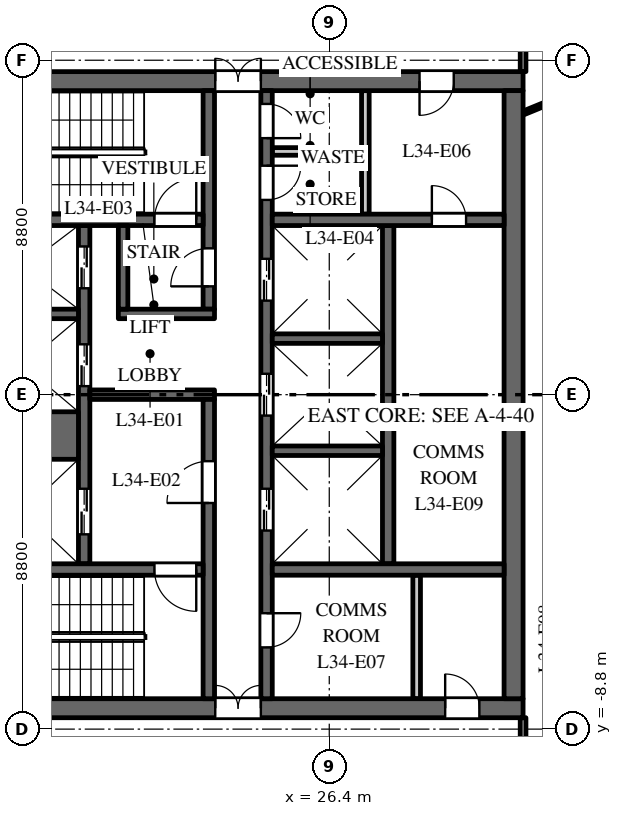
"""IFC4 building model, lengths in metres.
Left out: names, types, materials, properties, quantities, classifications, styles, units other than length and angle.
Written with IfcOpenShell. Run it as: python <this file> out.ifc"""

import sys

from ifc_helpers import new_model, si_unit, direction, frame, frame_2d, origin, place, context, subcontext, project, spatial, rectangle, extrude, element, fill, save


model = new_model("IFC4")
c1 = context("Model", 3, precision=1e-05, world=origin(), true_north=direction((0.0, 1.0)))
c2 = subcontext(c1, "Body", "Model", "MODEL_VIEW")
j1 = project(units=[si_unit("LENGTHUNIT", "METRE"), si_unit("PLANEANGLEUNIT", "RADIAN")], contexts=[c1])
p1 = place(None, origin())
s1 = spatial("IfcSite", under=j1, at=p1, CompositionType="ELEMENT")
p2 = place(p1, origin())
s2 = spatial("IfcBuilding", under=s1, at=p2, CompositionType="ELEMENT")
p3 = place(p2, frame((0.0, 0.0, 150.0)))
s3 = spatial("IfcBuildingStorey", under=s2, at=p3, CompositionType="ELEMENT", Elevation=150.0)
p4 = place(p3, frame((16.5, 8.25, 0.0), z_axis=(0.0, 0.0, 1.0), x_axis=(1.0, 0.0, 0.0)))
e1 = element("IfcWall", 1, at=p4, inside=s3, PredefinedType="SHEAR", context=c2, shape_type="SweptSolid", body=[
    extrude(rectangle(XDim=15.0, YDim=0.5, at=frame_2d((7.5, 0.0))), origin(), (0.0, 0.0, 1.0), 3.7),
])
p5 = place(p4, frame((6.9, 0.0, 0.0)))
e2 = element("IfcOpeningElement", 2, at=p5, cuts=e1, PredefinedType="OPENING", context=c2, shape_type="SweptSolid", body=[
    extrude(rectangle(XDim=1.2, YDim=2.1, at=frame_2d((0.6, 1.05))), frame((0.0, 0.26, 0.0), z_axis=(0.0, -1.0, 0.0), x_axis=(1.0, 0.0, 0.0)), (0.0, 0.0, 1.0), 0.52),
])
p6 = place(p4, frame((12.275, 0.0, 0.0)))
e3 = element("IfcOpeningElement", 3, at=p6, cuts=e1, PredefinedType="OPENING", context=c2, shape_type="SweptSolid", body=[
    extrude(rectangle(XDim=0.9, YDim=2.1, at=frame_2d((0.45, 1.05))), frame((0.0, 0.26, 0.0), z_axis=(0.0, -1.0, 0.0), x_axis=(1.0, 0.0, 0.0)), (0.0, 0.0, 1.0), 0.52),
])
p7 = place(p3, frame((16.5, -8.25, 0.0), z_axis=(0.0, 0.0, 1.0), x_axis=(1.0, 0.0, 0.0)))
e4 = element("IfcWall", 4, at=p7, inside=s3, PredefinedType="SHEAR", context=c2, shape_type="SweptSolid", body=[
    extrude(rectangle(XDim=15.0, YDim=0.5, at=frame_2d((7.5, 0.0))), origin(), (0.0, 0.0, 1.0), 3.7),
])
p8 = place(p7, frame((6.9, 0.0, 0.0)))
e5 = element("IfcOpeningElement", 5, at=p8, cuts=e4, PredefinedType="OPENING", context=c2, shape_type="SweptSolid", body=[
    extrude(rectangle(XDim=1.2, YDim=2.1, at=frame_2d((0.6, 1.05))), frame((0.0, 0.26, 0.0), z_axis=(0.0, -1.0, 0.0), x_axis=(1.0, 0.0, 0.0)), (0.0, 0.0, 1.0), 0.52),
])
p9 = place(p7, frame((12.95, 0.0, 0.0)))
e6 = element("IfcOpeningElement", 6, at=p9, cuts=e4, PredefinedType="OPENING", context=c2, shape_type="SweptSolid", body=[
    extrude(rectangle(XDim=0.9, YDim=2.1, at=frame_2d((0.45, 1.05))), frame((0.0, 0.26, 0.0), z_axis=(0.0, -1.0, 0.0), x_axis=(1.0, 0.0, 0.0)), (0.0, 0.0, 1.0), 0.52),
])
p10 = place(p3, frame((27.95, -4.45, 0.0), z_axis=(0.0, 0.0, 1.0), x_axis=(0.0, 1.0, 0.0)))
e7 = element("IfcWall", 7, at=p10, inside=s3, PredefinedType="SHEAR", context=c2, shape_type="SweptSolid", body=[
    extrude(rectangle(XDim=8.9, YDim=0.3, at=frame_2d((4.45, 0.0))), origin(), (0.0, 0.0, 1.0), 3.7),
])
p11 = place(p3, frame((19.95, -4.45, 0.0), z_axis=(0.0, 0.0, 1.0), x_axis=(0.0, 1.0, 0.0)))
e8 = element("IfcWall", 8, at=p11, inside=s3, PredefinedType="SHEAR", context=c2, shape_type="SweptSolid", body=[
    extrude(rectangle(XDim=8.9, YDim=0.3, at=frame_2d((4.45, 0.0))), origin(), (0.0, 0.0, 1.0), 3.7),
])
p12 = place(p11, frame((0.775, 0.0, 0.0)))
e9 = element("IfcOpeningElement", 9, at=p12, cuts=e8, PredefinedType="OPENING", context=c2, shape_type="SweptSolid", body=[
    extrude(rectangle(XDim=1.2, YDim=2.1, at=frame_2d((0.6, 1.05))), frame((0.0, 0.16, 0.0), z_axis=(0.0, -1.0, 0.0), x_axis=(1.0, 0.0, 0.0)), (0.0, 0.0, 1.0), 0.32),
])
p13 = place(p11, frame((4.675, 0.0, 0.0)))
e10 = element("IfcOpeningElement", 10, at=p13, cuts=e8, PredefinedType="OPENING", context=c2, shape_type="SweptSolid", body=[
    extrude(rectangle(XDim=1.1, YDim=2.1, at=frame_2d((0.55, 1.05))), frame((0.0, 0.16, 0.0), z_axis=(0.0, -1.0, 0.0), x_axis=(1.0, 0.0, 0.0)), (0.0, 0.0, 1.0), 0.32),
])
p14 = place(p11, frame((7.25, 0.0, 0.0)))
e11 = element("IfcOpeningElement", 11, at=p14, cuts=e8, PredefinedType="OPENING", context=c2, shape_type="SweptSolid", body=[
    extrude(rectangle(XDim=1.1, YDim=2.1, at=frame_2d((0.55, 1.05))), frame((0.0, 0.16, 0.0), z_axis=(0.0, -1.0, 0.0), x_axis=(1.0, 0.0, 0.0)), (0.0, 0.0, 1.0), 0.32),
])
p15 = place(p3, frame((24.75, -8.0, 0.0), z_axis=(0.0, 0.0, 1.0), x_axis=(0.0, 1.0, 0.0)))
e12 = element("IfcWall", 12, at=p15, inside=s3, PredefinedType="SHEAR", context=c2, shape_type="SweptSolid", body=[
    extrude(rectangle(XDim=16.0, YDim=0.3, at=frame_2d((8.0, 0.0))), origin(), (0.0, 0.0, 1.0), 3.7),
])
p16 = place(p15, frame((4.425, 0.0, 0.0)))
e13 = element("IfcOpeningElement", 13, at=p16, cuts=e12, PredefinedType="OPENING", context=c2, shape_type="SweptSolid", body=[
    extrude(rectangle(XDim=1.1, YDim=2.1, at=frame_2d((0.55, 1.05))), frame((0.0, 0.16, 0.0), z_axis=(0.0, -1.0, 0.0), x_axis=(1.0, 0.0, 0.0)), (0.0, 0.0, 1.0), 0.32),
])
p17 = place(p15, frame((7.45, 0.0, 0.0)))
e14 = element("IfcOpeningElement", 14, at=p17, cuts=e12, PredefinedType="OPENING", context=c2, shape_type="SweptSolid", body=[
    extrude(rectangle(XDim=1.1, YDim=2.1, at=frame_2d((0.55, 1.05))), frame((0.0, 0.16, 0.0), z_axis=(0.0, -1.0, 0.0), x_axis=(1.0, 0.0, 0.0)), (0.0, 0.0, 1.0), 0.32),
])
p18 = place(p15, frame((10.475, 0.0, 0.0)))
e15 = element("IfcOpeningElement", 15, at=p18, cuts=e12, PredefinedType="OPENING", context=c2, shape_type="SweptSolid", body=[
    extrude(rectangle(XDim=1.1, YDim=2.1, at=frame_2d((0.55, 1.05))), frame((0.0, 0.16, 0.0), z_axis=(0.0, -1.0, 0.0), x_axis=(1.0, 0.0, 0.0)), (0.0, 0.0, 1.0), 0.32),
])
p19 = place(p15, frame((13.125, 0.0, 0.0)))
e16 = element("IfcOpeningElement", 16, at=p19, cuts=e12, PredefinedType="OPENING", context=c2, shape_type="SweptSolid", body=[
    extrude(rectangle(XDim=0.9, YDim=2.1, at=frame_2d((0.45, 1.05))), frame((0.0, 0.16, 0.0), z_axis=(0.0, -1.0, 0.0), x_axis=(1.0, 0.0, 0.0)), (0.0, 0.0, 1.0), 0.32),
])
p20 = place(p15, frame((14.75, 0.0, 0.0)))
e17 = element("IfcOpeningElement", 17, at=p20, cuts=e12, PredefinedType="OPENING", context=c2, shape_type="SweptSolid", body=[
    extrude(rectangle(XDim=0.9, YDim=2.1, at=frame_2d((0.45, 1.05))), frame((0.0, 0.16, 0.0), z_axis=(0.0, -1.0, 0.0), x_axis=(1.0, 0.0, 0.0)), (0.0, 0.0, 1.0), 0.32),
])
p21 = place(p15, frame((1.35, 0.0, 0.0)))
e18 = element("IfcOpeningElement", 18, at=p21, cuts=e12, PredefinedType="OPENING", context=c2, shape_type="SweptSolid", body=[
    extrude(rectangle(XDim=0.9, YDim=2.1, at=frame_2d((0.45, 1.05))), frame((0.0, 0.16, 0.0), z_axis=(0.0, -1.0, 0.0), x_axis=(1.0, 0.0, 0.0)), (0.0, 0.0, 1.0), 0.32),
])
p22 = place(p3, frame((20.1, 0.0, 0.0), z_axis=(0.0, 0.0, 1.0), x_axis=(1.0, 0.0, 0.0)))
e19 = element("IfcWall", 19, at=p22, inside=s3, PredefinedType="SHEAR", context=c2, shape_type="SweptSolid", body=[
    extrude(rectangle(XDim=3.28, YDim=0.25, at=frame_2d((1.64, 0.0))), origin(), (0.0, 0.0, 1.0), 3.7),
])
p23 = place(p3, frame((31.25, -8.0, 0.0), z_axis=(0.0, 0.0, 1.0), x_axis=(0.0, 1.0, 0.0)))
e20 = element("IfcWall", 20, at=p23, inside=s3, PredefinedType="SHEAR", context=c2, shape_type="SweptSolid", body=[
    extrude(rectangle(XDim=16.0, YDim=0.5, at=frame_2d((8.0, 0.0))), origin(), (0.0, 0.0, 1.0), 3.7),
])
p24 = place(p3, frame((24.9, 4.6, 0.0), z_axis=(0.0, 0.0, 1.0), x_axis=(1.0, 0.0, 0.0)))
e21 = element("IfcWall", 21, at=p24, inside=s3, PredefinedType="SHEAR", context=c2, shape_type="SweptSolid", body=[
    extrude(rectangle(XDim=6.1, YDim=0.3, at=frame_2d((3.05, 0.0))), origin(), (0.0, 0.0, 1.0), 3.7),
])
p25 = place(p24, frame((4.2, 0.0, 0.0)))
e22 = element("IfcOpeningElement", 22, at=p25, cuts=e21, PredefinedType="OPENING", context=c2, shape_type="SweptSolid", body=[
    extrude(rectangle(XDim=0.9, YDim=2.1, at=frame_2d((0.45, 1.05))), frame((0.0, 0.16, 0.0), z_axis=(0.0, -1.0, 0.0), x_axis=(1.0, 0.0, 0.0)), (0.0, 0.0, 1.0), 0.32),
])
for number, where, z_axis, x_axis in (
    (23, (27.35, 4.75, 0.0), (0.0, 0.0, 1.0), (0.0, 1.0, 0.0)),
    (24, (28.7, -8.0, 0.0), (0.0, 0.0, 1.0), (0.0, 1.0, 0.0)),
):
    element("IfcWall", number, at=place(p3, frame(where, z_axis=z_axis, x_axis=x_axis)), inside=s3, PredefinedType="PARTITIONING", context=c2, shape_type="SweptSolid", body=[
        extrude(rectangle(XDim=3.25, YDim=0.2, at=frame_2d((1.625, 0.0))), origin(), (0.0, 0.0, 1.0), 3.7),
    ])
p26 = place(p3, frame((24.9, 6.4, 0.0), z_axis=(0.0, 0.0, 1.0), x_axis=(1.0, 0.0, 0.0)))
e25 = element("IfcWall", 25, at=p26, inside=s3, PredefinedType="PARTITIONING", context=c2, shape_type="SweptSolid", body=[
    extrude(rectangle(XDim=2.35, YDim=0.2, at=frame_2d((1.175, 0.0))), origin(), (0.0, 0.0, 1.0), 3.7),
])
p27 = place(p3, frame((24.9, -4.6, 0.0), z_axis=(0.0, 0.0, 1.0), x_axis=(1.0, 0.0, 0.0)))
e26 = element("IfcWall", 26, at=p27, inside=s3, PredefinedType="SHEAR", context=c2, shape_type="SweptSolid", body=[
    extrude(rectangle(XDim=6.1, YDim=0.3, at=frame_2d((3.05, 0.0))), origin(), (0.0, 0.0, 1.0), 3.7),
])
p28 = place(p3, frame((16.9, -1.075, 0.0), z_axis=(0.0, 0.0, 1.0), x_axis=(1.0, 0.0, 0.0)))
e27 = element("IfcWall", 27, at=p28, inside=s3, PredefinedType="SHEAR", context=c2, shape_type="SweptSolid", body=[
    extrude(rectangle(XDim=2.9, YDim=1.25, at=frame_2d((1.45, 0.0))), origin(), (0.0, 0.0, 1.0), 3.7),
])
for number, where, z_axis, x_axis in (
    (28, (16.9, 2.125, 0.0), (0.0, 0.0, 1.0), (1.0, 0.0, 0.0)),
    (29, (24.9, -1.475, 0.0), (0.0, 0.0, 1.0), (1.0, 0.0, 0.0)),
    (30, (24.9, 1.475, 0.0), (0.0, 0.0, 1.0), (1.0, 0.0, 0.0)),
):
    element("IfcWall", number, at=place(p3, frame(where, z_axis=z_axis, x_axis=x_axis)), inside=s3, PredefinedType="SHEAR", context=c2, shape_type="SweptSolid", body=[
        extrude(rectangle(XDim=2.9, YDim=0.25, at=frame_2d((1.45, 0.0))), origin(), (0.0, 0.0, 1.0), 3.7),
    ])
p29 = place(p3, frame((23.23, 2.25, 0.0), z_axis=(0.0, 0.0, 1.0), x_axis=(0.0, 1.0, 0.0)))
e31 = element("IfcWall", 31, at=p29, inside=s3, PredefinedType="SHEAR", context=c2, shape_type="SweptSolid", body=[
    extrude(rectangle(XDim=5.75, YDim=0.3, at=frame_2d((2.875, 0.0))), origin(), (0.0, 0.0, 1.0), 3.7),
])
p30 = place(p29, frame((0.6, 0.0, 0.0)))
e32 = element("IfcOpeningElement", 32, at=p30, cuts=e31, PredefinedType="OPENING", context=c2, shape_type="SweptSolid", body=[
    extrude(rectangle(XDim=1.0, YDim=2.1, at=frame_2d((0.5, 1.05))), frame((0.0, 0.16, 0.0), z_axis=(0.0, -1.0, 0.0), x_axis=(1.0, 0.0, 0.0)), (0.0, 0.0, 1.0), 0.32),
])
p31 = place(p3, frame((23.23, -8.0, 0.0), z_axis=(0.0, 0.0, 1.0), x_axis=(0.0, 1.0, 0.0)))
e33 = element("IfcWall", 33, at=p31, inside=s3, PredefinedType="SHEAR", context=c2, shape_type="SweptSolid", body=[
    extrude(rectangle(XDim=7.875, YDim=0.3, at=frame_2d((3.938, 0.0))), origin(), (0.0, 0.0, 1.0), 3.7),
])
p32 = place(p31, frame((5.15, 0.0, 0.0)))
e34 = element("IfcOpeningElement", 34, at=p32, cuts=e33, PredefinedType="OPENING", context=c2, shape_type="SweptSolid", body=[
    extrude(rectangle(XDim=1.1, YDim=2.1, at=frame_2d((0.55, 1.05))), frame((0.0, 0.16, 0.0), z_axis=(0.0, -1.0, 0.0), x_axis=(1.0, 0.0, 0.0)), (0.0, 0.0, 1.0), 0.32),
])
p33 = place(p3, frame((16.9, 4.6, 0.0), z_axis=(0.0, 0.0, 1.0), x_axis=(1.0, 0.0, 0.0)))
e35 = element("IfcWall", 35, at=p33, inside=s3, PredefinedType="SHEAR", context=c2, shape_type="SweptSolid", body=[
    extrude(rectangle(XDim=6.18, YDim=0.3, at=frame_2d((3.09, 0.0))), origin(), (0.0, 0.0, 1.0), 3.7),
])
p34 = place(p33, frame((4.9, 0.0, 0.0)))
e36 = element("IfcOpeningElement", 36, at=p34, cuts=e35, PredefinedType="OPENING", context=c2, shape_type="SweptSolid", body=[
    extrude(rectangle(XDim=1.1, YDim=2.1, at=frame_2d((0.55, 1.05))), frame((0.0, 0.16, 0.0), z_axis=(0.0, -1.0, 0.0), x_axis=(1.0, 0.0, 0.0)), (0.0, 0.0, 1.0), 0.32),
])
p35 = place(p3, frame((16.9, -4.6, 0.0), z_axis=(0.0, 0.0, 1.0), x_axis=(1.0, 0.0, 0.0)))
e37 = element("IfcWall", 37, at=p35, inside=s3, PredefinedType="SHEAR", context=c2, shape_type="SweptSolid", body=[
    extrude(rectangle(XDim=6.18, YDim=0.3, at=frame_2d((3.09, 0.0))), origin(), (0.0, 0.0, 1.0), 3.7),
])
p36 = place(p35, frame((4.9, 0.0, 0.0)))
e38 = element("IfcOpeningElement", 38, at=p36, cuts=e37, PredefinedType="OPENING", context=c2, shape_type="SweptSolid", body=[
    extrude(rectangle(XDim=1.1, YDim=2.1, at=frame_2d((0.55, 1.05))), frame((0.0, 0.16, 0.0), z_axis=(0.0, -1.0, 0.0), x_axis=(1.0, 0.0, 0.0)), (0.0, 0.0, 1.0), 0.32),
])
p37 = place(p3, frame((20.85, 2.125, 0.0), z_axis=(0.0, 0.0, 1.0), x_axis=(1.0, 0.0, 0.0)))
e39 = element("IfcWall", 39, at=p37, inside=s3, PredefinedType="SHEAR", context=c2, shape_type="SweptSolid", body=[
    extrude(rectangle(XDim=2.53, YDim=0.25, at=frame_2d((1.265, 0.0))), origin(), (0.0, 0.0, 1.0), 3.7),
])
p38 = place(p3, frame((20.975, 2.25, 0.0), z_axis=(0.0, 0.0, 1.0), x_axis=(0.0, 1.0, 0.0)))
e40 = element("IfcWall", 40, at=p38, inside=s3, PredefinedType="SHEAR", context=c2, shape_type="SweptSolid", body=[
    extrude(rectangle(XDim=2.2, YDim=0.25, at=frame_2d((1.1, 0.0))), origin(), (0.0, 0.0, 1.0), 3.7),
])
p39 = place(p3, frame((31.5, -10.7, 0.0), z_axis=(0.0, 0.0, 1.0), x_axis=(0.0, 1.0, 0.0)))
e41 = element("IfcWall", 41, at=p39, inside=s3, PredefinedType="PARTITIONING", context=c2, shape_type="SweptSolid", body=[
    extrude(rectangle(XDim=2.2, YDim=0.15, at=frame_2d((1.1, 0.0))), origin(), (0.0, 0.0, 1.0), 2.9),
])
p40 = place(p3, frame((31.5, 7.41, 0.0), z_axis=(0.0, 0.0, 1.0), x_axis=(0.925344112436, 0.379128307542, 0.0)))
e42 = element("IfcWall", 42, at=p40, inside=s3, PredefinedType="PARTITIONING", context=c2, shape_type="SweptSolid", body=[
    extrude(rectangle(XDim=2.954, YDim=0.1, at=frame_2d((1.477, 0.0))), origin(), (0.0, 0.0, 1.0), 3.7),
])
p41 = place(p3, frame((31.5, 8.5, 0.0), z_axis=(0.0, 0.0, 1.0), x_axis=(0.0, 1.0, 0.0)))
e43 = element("IfcWall", 43, at=p41, inside=s3, PredefinedType="PARTITIONING", context=c2, shape_type="SweptSolid", body=[
    extrude(rectangle(XDim=2.2, YDim=0.15, at=frame_2d((1.1, 0.0))), origin(), (0.0, 0.0, 1.0), 2.9),
])
p42 = place(p12, origin())
e44 = element("IfcDoor", 44, at=p42, inside=s3, OperationType="DOUBLE_DOOR_SLIDING", PredefinedType="DOOR", context=c2, shape_type="SweptSolid", body=[
    extrude(rectangle(XDim=1.2, YDim=2.1, at=frame_2d((0.6, 1.05))), frame((0.0, 0.025, 0.0), z_axis=(0.0, -1.0, 0.0), x_axis=(1.0, 0.0, 0.0)), (0.0, 0.0, 1.0), 0.05),
])
fill(e9, e44)
p43 = place(p13, origin())
e45 = element("IfcDoor", 45, at=p43, inside=s3, OperationType="DOUBLE_DOOR_SLIDING", PredefinedType="DOOR", context=c2, shape_type="SweptSolid", body=[
    extrude(rectangle(XDim=1.1, YDim=2.1, at=frame_2d((0.55, 1.05))), frame((0.0, 0.025, 0.0), z_axis=(0.0, -1.0, 0.0), x_axis=(1.0, 0.0, 0.0)), (0.0, 0.0, 1.0), 0.05),
])
fill(e10, e45)
p44 = place(p14, origin())
e46 = element("IfcDoor", 46, at=p44, inside=s3, OperationType="DOUBLE_DOOR_SLIDING", PredefinedType="DOOR", context=c2, shape_type="SweptSolid", body=[
    extrude(rectangle(XDim=1.1, YDim=2.1, at=frame_2d((0.55, 1.05))), frame((0.0, 0.025, 0.0), z_axis=(0.0, -1.0, 0.0), x_axis=(1.0, 0.0, 0.0)), (0.0, 0.0, 1.0), 0.05),
])
fill(e11, e46)
p45 = place(p16, origin())
e47 = element("IfcDoor", 47, at=p45, inside=s3, OperationType="DOUBLE_DOOR_SLIDING", PredefinedType="DOOR", context=c2, shape_type="SweptSolid", body=[
    extrude(rectangle(XDim=1.1, YDim=2.1, at=frame_2d((0.55, 1.05))), frame((0.0, 0.025, 0.0), z_axis=(0.0, -1.0, 0.0), x_axis=(1.0, 0.0, 0.0)), (0.0, 0.0, 1.0), 0.05),
])
fill(e13, e47)
p46 = place(p17, origin())
e48 = element("IfcDoor", 48, at=p46, inside=s3, OperationType="DOUBLE_DOOR_SLIDING", PredefinedType="DOOR", context=c2, shape_type="SweptSolid", body=[
    extrude(rectangle(XDim=1.1, YDim=2.1, at=frame_2d((0.55, 1.05))), frame((0.0, 0.025, 0.0), z_axis=(0.0, -1.0, 0.0), x_axis=(1.0, 0.0, 0.0)), (0.0, 0.0, 1.0), 0.05),
])
fill(e14, e48)
p47 = place(p18, origin())
e49 = element("IfcDoor", 49, at=p47, inside=s3, OperationType="DOUBLE_DOOR_SLIDING", PredefinedType="DOOR", context=c2, shape_type="SweptSolid", body=[
    extrude(rectangle(XDim=1.1, YDim=2.1, at=frame_2d((0.55, 1.05))), frame((0.0, 0.025, 0.0), z_axis=(0.0, -1.0, 0.0), x_axis=(1.0, 0.0, 0.0)), (0.0, 0.0, 1.0), 0.05),
])
fill(e15, e49)
p48 = place(p34, origin())
e50 = element("IfcDoor", 50, at=p48, inside=s3, OperationType="SINGLE_SWING_LEFT", PredefinedType="DOOR", context=c2, shape_type="SweptSolid", body=[
    extrude(rectangle(XDim=1.1, YDim=2.1, at=frame_2d((0.55, 1.05))), frame((0.0, 0.025, 0.0), z_axis=(0.0, -1.0, 0.0), x_axis=(1.0, 0.0, 0.0)), (0.0, 0.0, 1.0), 0.05),
])
fill(e36, e50)
p49 = place(p36, origin())
e51 = element("IfcDoor", 51, at=p49, inside=s3, OperationType="SINGLE_SWING_RIGHT", PredefinedType="DOOR", context=c2, shape_type="SweptSolid", body=[
    extrude(rectangle(XDim=1.1, YDim=2.1, at=frame_2d((0.55, 1.05))), frame((0.0, 0.025, 0.0), z_axis=(0.0, -1.0, 0.0), x_axis=(1.0, 0.0, 0.0)), (0.0, 0.0, 1.0), 0.05),
])
fill(e38, e51)
p50 = place(p32, origin())
e52 = element("IfcDoor", 52, at=p50, inside=s3, OperationType="SINGLE_SWING_RIGHT", PredefinedType="DOOR", context=c2, shape_type="SweptSolid", body=[
    extrude(rectangle(XDim=1.1, YDim=2.1, at=frame_2d((0.55, 1.05))), frame((0.0, 0.025, 0.0), z_axis=(0.0, -1.0, 0.0), x_axis=(1.0, 0.0, 0.0)), (0.0, 0.0, 1.0), 0.05),
])
fill(e34, e52)
p51 = place(p30, origin())
e53 = element("IfcDoor", 53, at=p51, inside=s3, OperationType="SINGLE_SWING_RIGHT", PredefinedType="DOOR", context=c2, shape_type="SweptSolid", body=[
    extrude(rectangle(XDim=1.0, YDim=2.1, at=frame_2d((0.5, 1.05))), frame((0.0, 0.025, 0.0), z_axis=(0.0, -1.0, 0.0), x_axis=(1.0, 0.0, 0.0)), (0.0, 0.0, 1.0), 0.05),
])
fill(e32, e53)
p52 = place(p5, origin())
e54 = element("IfcDoor", 54, at=p52, inside=s3, OperationType="DOUBLE_DOOR_DOUBLE_SWING", PredefinedType="DOOR", context=c2, shape_type="SweptSolid", body=[
    extrude(rectangle(XDim=1.2, YDim=2.1, at=frame_2d((0.6, 1.05))), frame((0.0, 0.025, 0.0), z_axis=(0.0, -1.0, 0.0), x_axis=(1.0, 0.0, 0.0)), (0.0, 0.0, 1.0), 0.05),
])
fill(e2, e54)
p53 = place(p8, origin())
e55 = element("IfcDoor", 55, at=p53, inside=s3, OperationType="DOUBLE_DOOR_DOUBLE_SWING", PredefinedType="DOOR", context=c2, shape_type="SweptSolid", body=[
    extrude(rectangle(XDim=1.2, YDim=2.1, at=frame_2d((0.6, 1.05))), frame((0.0, 0.025, 0.0), z_axis=(0.0, -1.0, 0.0), x_axis=(1.0, 0.0, 0.0)), (0.0, 0.0, 1.0), 0.05),
])
fill(e5, e55)
p54 = place(p19, origin())
e56 = element("IfcDoor", 56, at=p54, inside=s3, OperationType="SINGLE_SWING_RIGHT", PredefinedType="DOOR", context=c2, shape_type="SweptSolid", body=[
    extrude(rectangle(XDim=0.9, YDim=2.1, at=frame_2d((0.45, 1.05))), frame((0.0, 0.025, 0.0), z_axis=(0.0, -1.0, 0.0), x_axis=(1.0, 0.0, 0.0)), (0.0, 0.0, 1.0), 0.05),
])
fill(e16, e56)
p55 = place(p20, origin())
e57 = element("IfcDoor", 57, at=p55, inside=s3, OperationType="SINGLE_SWING_LEFT", PredefinedType="DOOR", context=c2, shape_type="SweptSolid", body=[
    extrude(rectangle(XDim=0.9, YDim=2.1, at=frame_2d((0.45, 1.05))), frame((0.0, 0.025, 0.0), z_axis=(0.0, -1.0, 0.0), x_axis=(1.0, 0.0, 0.0)), (0.0, 0.0, 1.0), 0.05),
])
fill(e17, e57)
p56 = place(p6, origin())
e58 = element("IfcDoor", 58, at=p56, inside=s3, OperationType="SINGLE_SWING_LEFT", PredefinedType="DOOR", context=c2, shape_type="SweptSolid", body=[
    extrude(rectangle(XDim=0.9, YDim=2.1, at=frame_2d((0.45, 1.05))), frame((0.0, 0.025, 0.0), z_axis=(0.0, -1.0, 0.0), x_axis=(1.0, 0.0, 0.0)), (0.0, 0.0, 1.0), 0.05),
])
fill(e3, e58)
p57 = place(p21, origin())
e59 = element("IfcDoor", 59, at=p57, inside=s3, OperationType="SINGLE_SWING_RIGHT", PredefinedType="DOOR", context=c2, shape_type="SweptSolid", body=[
    extrude(rectangle(XDim=0.9, YDim=2.1, at=frame_2d((0.45, 1.05))), frame((0.0, 0.025, 0.0), z_axis=(0.0, -1.0, 0.0), x_axis=(1.0, 0.0, 0.0)), (0.0, 0.0, 1.0), 0.05),
])
fill(e18, e59)
p58 = place(p9, origin())
e60 = element("IfcDoor", 60, at=p58, inside=s3, OperationType="SINGLE_SWING_RIGHT", PredefinedType="DOOR", context=c2, shape_type="SweptSolid", body=[
    extrude(rectangle(XDim=0.9, YDim=2.1, at=frame_2d((0.45, 1.05))), frame((0.0, 0.025, 0.0), z_axis=(0.0, -1.0, 0.0), x_axis=(1.0, 0.0, 0.0)), (0.0, 0.0, 1.0), 0.05),
])
fill(e6, e60)
p59 = place(p25, origin())
e61 = element("IfcDoor", 61, at=p59, inside=s3, OperationType="SINGLE_SWING_RIGHT", PredefinedType="DOOR", context=c2, shape_type="SweptSolid", body=[
    extrude(rectangle(XDim=0.9, YDim=2.1, at=frame_2d((0.45, 1.05))), frame((0.0, 0.025, 0.0), z_axis=(0.0, -1.0, 0.0), x_axis=(1.0, 0.0, 0.0)), (0.0, 0.0, 1.0), 0.05),
])
fill(e22, e61)
save(model, sys.argv[1])
